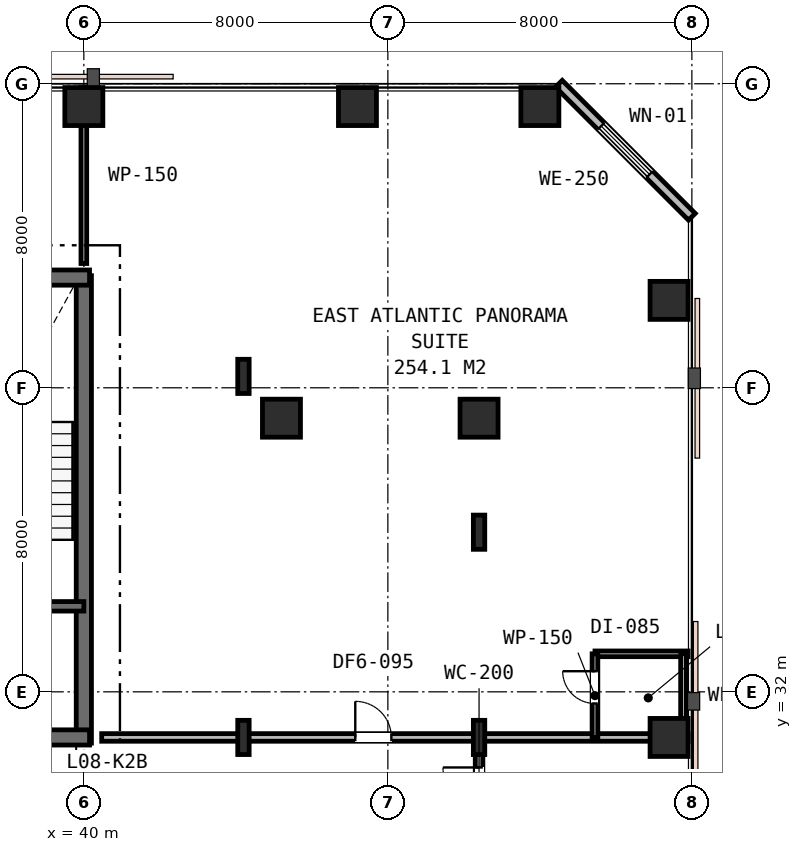
"""IFC4 building model, lengths in metres.
Left out: names, types, materials, properties, quantities, classifications, styles, units other than length and angle.
Written with IfcOpenShell. Run it as: python <this file> out.ifc"""

import sys

from ifc_helpers import new_model, si_unit, direction, frame, frame_2d, origin, origin_2d, place, context, subcontext, project, spatial, rectangle, i_section, extrude, element, fill, save


model = new_model("IFC4")
c1 = context("Model", 3, precision=1e-05, world=origin(), true_north=direction((0.0, 1.0)))
c2 = subcontext(c1, "Body", "Model", "MODEL_VIEW")
j1 = project(units=[si_unit("LENGTHUNIT", "METRE"), si_unit("PLANEANGLEUNIT", "RADIAN")], contexts=[c1])
p1 = place(None, origin())
s1 = spatial("IfcSite", under=j1, at=p1, CompositionType="ELEMENT")
p2 = place(p1, origin())
s2 = spatial("IfcBuilding", under=s1, at=p2, CompositionType="ELEMENT")
p3 = place(p2, frame((0.0, 0.0, 36.6)))
s3 = spatial("IfcBuildingStorey", under=s2, at=p3, CompositionType="ELEMENT", Elevation=36.6)
p4 = place(p3, frame((40.0, 30.65, 0.0), z_axis=(0.0, 0.0, 1.0), x_axis=(0.0, 1.0, 0.0)))
e1 = element("IfcWall", 1, at=p4, inside=s3, PredefinedType="SHEAR", context=c2, shape_type="SweptSolid", body=[
    extrude(rectangle(XDim=12.3, YDim=0.4, at=frame_2d((6.15, 0.0))), origin(), (0.0, 0.0, 1.0), 3.6),
])
p5 = place(p3, frame((15.85, 42.9, 0.0), z_axis=(0.0, 0.0, 1.0), x_axis=(1.0, 0.0, 0.0)))
e2 = element("IfcWall", 2, at=p5, inside=s3, PredefinedType="SHEAR", context=c2, shape_type="SweptSolid", body=[
    extrude(rectangle(XDim=24.3, YDim=0.4, at=frame_2d((12.15, 0.0))), origin(), (0.0, 0.0, 1.0), 3.6),
])
p6 = place(p3, frame((28.95, 30.8, 0.0), z_axis=(0.0, 0.0, 1.0), x_axis=(1.0, 0.0, 0.0)))
e3 = element("IfcWall", 3, at=p6, inside=s3, PredefinedType="SHEAR", context=c2, shape_type="SweptSolid", body=[
    extrude(rectangle(XDim=11.2, YDim=0.4, at=frame_2d((5.6, 0.0))), origin(), (0.0, 0.0, 1.0), 3.6),
])
p7 = place(p6, frame((7.65, 0.0, 0.0)))
e4 = element("IfcOpeningElement", 4, at=p7, cuts=e3, PredefinedType="OPENING", context=c2, shape_type="SweptSolid", body=[
    extrude(rectangle(XDim=1.1, YDim=2.15, at=frame_2d((0.55, 1.075))), frame((0.0, 0.21, 0.0), z_axis=(0.0, -1.0, 0.0), x_axis=(1.0, 0.0, 0.0)), (0.0, 0.0, 1.0), 0.42),
])
p8 = place(p3, frame((33.95, 34.25, 0.0), z_axis=(0.0, 0.0, 1.0), x_axis=(1.0, 0.0, 0.0)))
e5 = element("IfcWall", 5, at=p8, inside=s3, PredefinedType="SHEAR", context=c2, shape_type="SweptSolid", body=[
    extrude(rectangle(XDim=6.05, YDim=0.25, at=frame_2d((3.025, 0.0))), origin(), (0.0, 0.0, 1.0), 3.6),
])
p9 = place(p8, frame((3.7, 0.0, 0.0)))
e6 = element("IfcOpeningElement", 6, at=p9, cuts=e5, PredefinedType="OPENING", context=c2, shape_type="SweptSolid", body=[
    extrude(rectangle(XDim=1.0, YDim=2.15, at=frame_2d((0.5, 1.075))), frame((0.0, 0.135, 0.0), z_axis=(0.0, -1.0, 0.0), x_axis=(1.0, 0.0, 0.0)), (0.0, 0.0, 1.0), 0.27),
])
p10 = place(p8, frame((0.55, 0.0, 0.0)))
e7 = element("IfcOpeningElement", 7, at=p10, cuts=e5, PredefinedType="OPENING", context=c2, shape_type="SweptSolid", body=[
    extrude(rectangle(XDim=1.1, YDim=2.15, at=frame_2d((0.55, 1.075))), frame((0.0, 0.135, 0.0), z_axis=(0.0, -1.0, 0.0), x_axis=(1.0, 0.0, 0.0)), (0.0, 0.0, 1.0), 0.27),
])
for number, where, z_axis, x_axis in (
    (8, (45.2, 39.2, 0.0), (0.0, 0.0, 1.0), (1.0, 0.0, 0.0)),
    (9, (40.0, 47.4, 0.0), (0.0, 0.0, 1.0), (1.0, 0.0, 0.0)),
    (10, (47.2, 47.4, 0.0), (0.0, 0.0, 1.0), (1.0, 0.0, 0.0)),
    (11, (50.4, 39.2, 0.0), (0.0, 0.0, 1.0), (1.0, 0.0, 0.0)),
    (12, (55.4, 30.8, 0.0), (0.0, 0.0, 1.0), (1.0, 0.0, 0.0)),
    (13, (55.4, 42.3, 0.0), (0.0, 0.0, 1.0), (1.0, 0.0, 0.0)),
    (14, (52.0, 47.4, 0.0), (0.0, 0.0, 1.0), (1.0, 0.0, 0.0)),
):
    element("IfcColumn", number, at=place(p3, frame(where, z_axis=z_axis, x_axis=x_axis)), inside=s3, PredefinedType="COLUMN", context=c2, shape_type="SweptSolid", body=[
        extrude(rectangle(XDim=1.0, YDim=1.0, at=origin_2d()), origin(), (0.0, 0.0, 1.0), 3.6),
    ])
for number, where, z_axis, x_axis in (
    (15, (44.2, 30.8, 0.0), (0.0, 0.0, 1.0), (1.0, 0.0, 0.0)),
    (16, (44.2, 40.3, 0.0), (0.0, 0.0, 1.0), (1.0, 0.0, 0.0)),
    (17, (50.4, 30.8, 0.0), (0.0, 0.0, 1.0), (1.0, 0.0, 0.0)),
    (18, (50.4, 36.2, 0.0), (0.0, 0.0, 1.0), (1.0, 0.0, 0.0)),
):
    element("IfcColumn", number, at=place(p3, frame(where, z_axis=z_axis, x_axis=x_axis)), inside=s3, PredefinedType="COLUMN", context=c2, shape_type="SweptSolid", body=[
        extrude(i_section(OverallWidth=0.3, OverallDepth=0.9, WebThickness=0.018, FlangeThickness=0.035, FilletRadius=0.03, at=origin_2d()), origin(), (0.0, 0.0, 1.0), 3.6),
    ])
p11 = place(p3, frame((56.0, 44.5, 0.0), z_axis=(0.0, 0.0, 1.0), x_axis=(-0.707106781187, 0.707106781187, 0.0)))
e19 = element("IfcWall", 19, at=p11, inside=s3, PredefinedType="STANDARD", context=c2, shape_type="SweptSolid", body=[
    extrude(rectangle(XDim=4.95, YDim=0.25, at=frame_2d((2.475, 0.0))), origin(), (0.0, 0.0, 1.0), 3.33),
])
p12 = place(p11, frame((1.575, 0.0, 0.75)))
e20 = element("IfcOpeningElement", 20, at=p12, cuts=e19, PredefinedType="OPENING", context=c2, shape_type="SweptSolid", body=[
    extrude(rectangle(XDim=1.8, YDim=1.85, at=frame_2d((0.9, 0.925))), frame((0.0, 0.135, 0.0), z_axis=(0.0, -1.0, 0.0), x_axis=(1.0, 0.0, 0.0)), (0.0, 0.0, 1.0), 0.27),
])
p13 = place(p3, frame((40.0, 43.27, 0.0), z_axis=(0.0, 0.0, 1.0), x_axis=(0.0, 1.0, 0.0)))
e21 = element("IfcWall", 21, at=p13, inside=s3, PredefinedType="PARTITIONING", context=c2, shape_type="SweptSolid", body=[
    extrude(rectangle(XDim=4.63, YDim=0.15, at=frame_2d((2.315, 0.0))), origin(), (0.0, 0.0, 1.0), 2.93),
])
p14 = place(p3, frame((40.47, 30.8, 0.0), z_axis=(0.0, 0.0, 1.0), x_axis=(1.0, 0.0, 0.0)))
e22 = element("IfcWall", 22, at=p14, inside=s3, PredefinedType="PARTITIONING", context=c2, shape_type="SweptSolid", body=[
    extrude(rectangle(XDim=15.43, YDim=0.2, at=frame_2d((7.715, 0.0))), origin(), (0.0, 0.0, 1.0), 2.82),
])
p15 = place(p14, frame((6.673, 0.0, 0.0)))
e23 = element("IfcOpeningElement", 23, at=p15, cuts=e22, PredefinedType="OPENING", context=c2, shape_type="SweptSolid", body=[
    extrude(rectangle(XDim=0.95, YDim=2.15, at=frame_2d((0.475, 1.075))), frame((0.0, 0.11, 0.0), z_axis=(0.0, -1.0, 0.0), x_axis=(1.0, 0.0, 0.0)), (0.0, 0.0, 1.0), 0.22),
])
p16 = place(p3, frame((53.45, 33.0, 0.0), z_axis=(0.0, 0.0, 1.0), x_axis=(1.0, 0.0, 0.0)))
e24 = element("IfcWall", 24, at=p16, inside=s3, PredefinedType="PARTITIONING", context=c2, shape_type="SweptSolid", body=[
    extrude(rectangle(XDim=2.45, YDim=0.15, at=frame_2d((1.225, 0.0))), origin(), (0.0, 0.0, 1.0), 2.93),
])
p17 = place(p3, frame((53.45, 30.8, 0.0), z_axis=(0.0, 0.0, 1.0), x_axis=(0.0, 1.0, 0.0)))
e25 = element("IfcWall", 25, at=p17, inside=s3, PredefinedType="PARTITIONING", context=c2, shape_type="SweptSolid", body=[
    extrude(rectangle(XDim=2.2, YDim=0.15, at=frame_2d((1.1, 0.0))), origin(), (0.0, 0.0, 1.0), 2.82),
])
p18 = place(p17, frame((0.892, 0.0, 0.0)))
e26 = element("IfcOpeningElement", 26, at=p18, cuts=e25, PredefinedType="OPENING", context=c2, shape_type="SweptSolid", body=[
    extrude(rectangle(XDim=0.85, YDim=2.15, at=frame_2d((0.425, 1.075))), frame((0.0, 0.085, 0.0), z_axis=(0.0, -1.0, 0.0), x_axis=(1.0, 0.0, 0.0)), (0.0, 0.0, 1.0), 0.17),
])
p19 = place(p3, frame((55.78, 33.0, 0.0), z_axis=(0.0, 0.0, 1.0), x_axis=(0.0, -1.0, 0.0)))
e27 = element("IfcWall", 27, at=p19, inside=s3, PredefinedType="PARTITIONING", context=c2, shape_type="SweptSolid", body=[
    extrude(rectangle(XDim=2.2, YDim=0.15, at=frame_2d((1.1, 0.0))), origin(), (0.0, 0.0, 1.0), 2.82),
])
p20 = place(p3, frame((50.4, 28.6, 0.0), z_axis=(0.0, 0.0, 1.0), x_axis=(0.0, 1.0, 0.0)))
e28 = element("IfcWall", 28, at=p20, inside=s3, PredefinedType="PARTITIONING", context=c2, shape_type="SweptSolid", body=[
    extrude(rectangle(XDim=2.2, YDim=0.2, at=frame_2d((1.1, 0.0))), origin(), (0.0, 0.0, 1.0), 2.82),
])
p21 = place(p20, frame((0.46, 0.0, 0.0)))
e29 = element("IfcOpeningElement", 29, at=p21, cuts=e28, PredefinedType="OPENING", context=c2, shape_type="SweptSolid", body=[
    extrude(rectangle(XDim=0.95, YDim=2.15, at=frame_2d((0.475, 1.075))), frame((0.0, 0.11, 0.0), z_axis=(0.0, -1.0, 0.0), x_axis=(1.0, 0.0, 0.0)), (0.0, 0.0, 1.0), 0.22),
])
p22 = place(p12, origin())
e30 = element("IfcWindow", 30, at=p22, inside=s3, PartitioningType="SINGLE_PANEL", PredefinedType="WINDOW", context=c2, shape_type="SweptSolid", body=[
    extrude(rectangle(XDim=1.8, YDim=1.85, at=frame_2d((0.9, 0.925))), frame((0.0, 0.03, 0.0), z_axis=(0.0, -1.0, 0.0), x_axis=(1.0, 0.0, 0.0)), (0.0, 0.0, 1.0), 0.06),
])
fill(e20, e30)
p23 = place(p15, origin())
e31 = element("IfcDoor", 31, at=p23, inside=s3, OperationType="SINGLE_SWING_LEFT", PredefinedType="DOOR", context=c2, shape_type="SweptSolid", body=[
    extrude(rectangle(XDim=0.95, YDim=2.15, at=frame_2d((0.475, 1.075))), frame((0.0, 0.025, 0.0), z_axis=(0.0, -1.0, 0.0), x_axis=(1.0, 0.0, 0.0)), (0.0, 0.0, 1.0), 0.05),
])
fill(e23, e31)
p24 = place(p18, origin())
e32 = element("IfcDoor", 32, at=p24, inside=s3, OperationType="SINGLE_SWING_RIGHT", PredefinedType="DOOR", context=c2, shape_type="SweptSolid", body=[
    extrude(rectangle(XDim=0.85, YDim=2.15, at=frame_2d((0.425, 1.075))), frame((0.0, 0.025, 0.0), z_axis=(0.0, -1.0, 0.0), x_axis=(1.0, 0.0, 0.0)), (0.0, 0.0, 1.0), 0.05),
])
fill(e26, e32)
p25 = place(p21, origin())
e33 = element("IfcDoor", 33, at=p25, inside=s3, OperationType="SINGLE_SWING_RIGHT", PredefinedType="DOOR", context=c2, shape_type="SweptSolid", body=[
    extrude(rectangle(XDim=0.95, YDim=2.15, at=frame_2d((0.475, 1.075))), frame((0.0, 0.025, 0.0), z_axis=(0.0, -1.0, 0.0), x_axis=(1.0, 0.0, 0.0)), (0.0, 0.0, 1.0), 0.05),
])
fill(e29, e33)
save(model, sys.argv[1])
